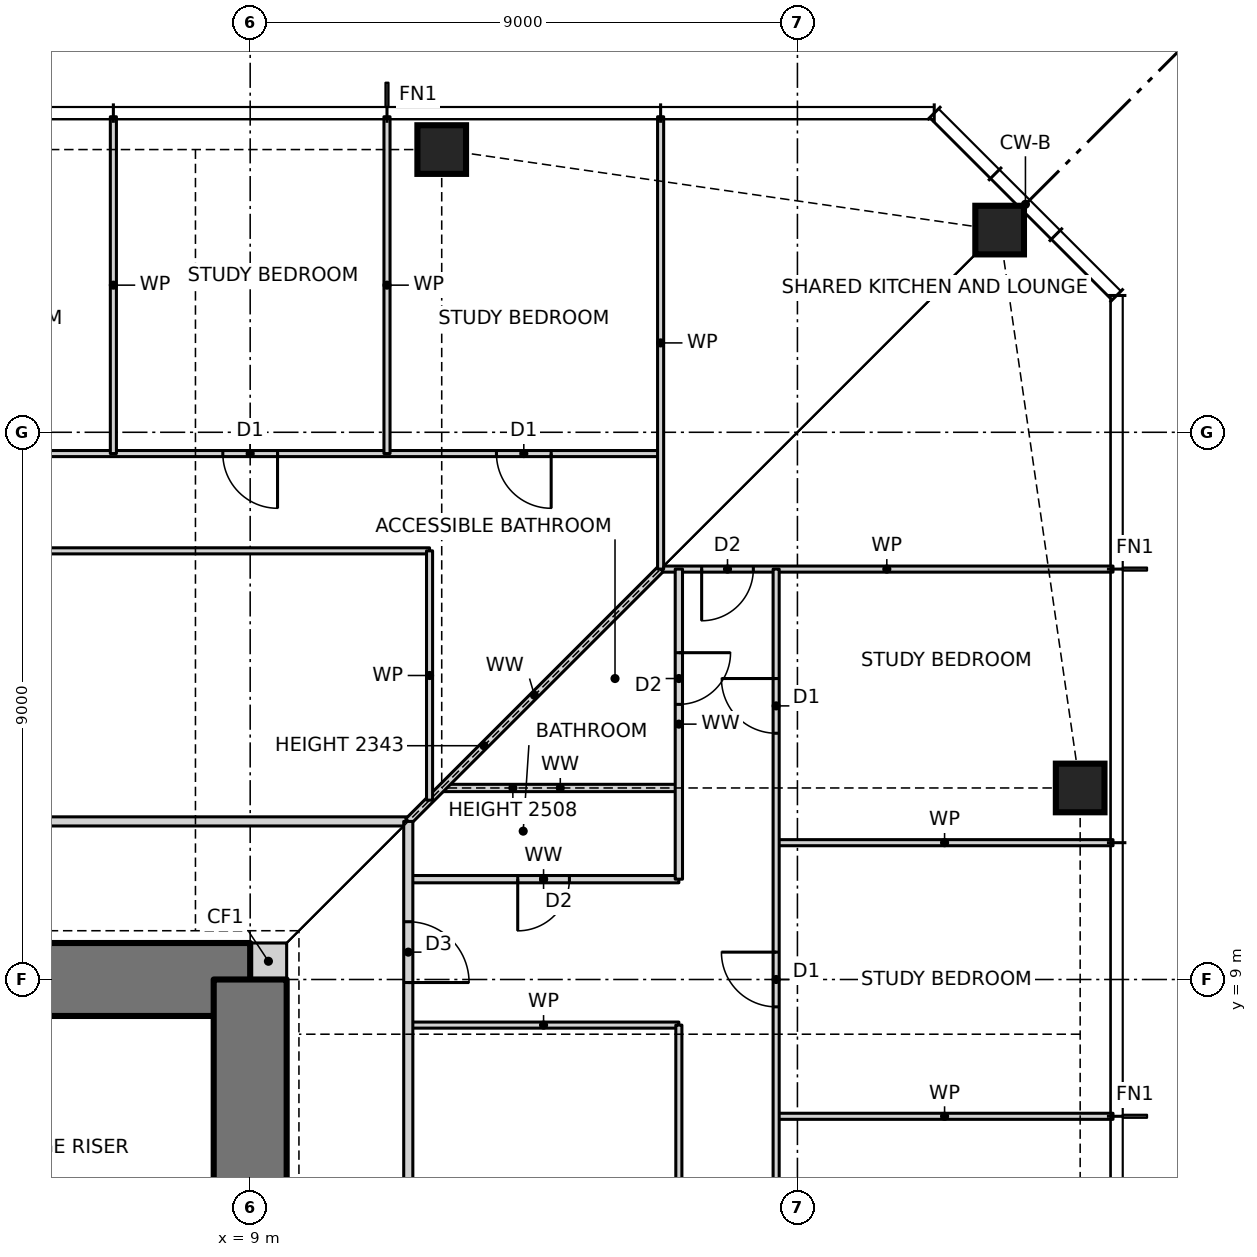
"""IFC4 building model, lengths in metres.
Left out: names, types, materials, properties, quantities, classifications, styles, units other than length and angle.
Written with IfcOpenShell. Run it as: python <this file> out.ifc"""

import sys

from ifc_helpers import new_model, si_unit, direction, frame, frame_2d, origin, origin_2d, place, context, subcontext, project, spatial, rectangle, hollow_rectangle, extrude, element, fill, save


model = new_model("IFC4")
c1 = context("Model", 3, precision=1e-05, world=origin(), true_north=direction((0.0, 1.0)))
c2 = subcontext(c1, "Body", "Model", "MODEL_VIEW")
j1 = project(units=[si_unit("LENGTHUNIT", "METRE"), si_unit("PLANEANGLEUNIT", "RADIAN")], contexts=[c1])
p1 = place(None, origin())
s1 = spatial("IfcSite", under=j1, at=p1, CompositionType="ELEMENT")
p2 = place(p1, origin())
s2 = spatial("IfcBuilding", under=s1, at=p2, CompositionType="ELEMENT")
p3 = place(p2, frame((0.0, 0.0, 15.0)))
s3 = spatial("IfcBuildingStorey", under=s2, at=p3, CompositionType="ELEMENT", Elevation=15.0)
for number, where, z_axis, x_axis in (
    (1, (22.65, 12.15, 0.0), (0.0, 0.0, 1.0), (1.0, 0.0, 0.0)),
    (2, (21.326, 21.326, 0.0), (0.0, 0.0, 1.0), (1.0, 0.0, 0.0)),
    (3, (12.15, 22.65, 0.0), (0.0, 0.0, 1.0), (1.0, 0.0, 0.0)),
):
    element("IfcColumn", number, at=place(p3, frame(where, z_axis=z_axis, x_axis=x_axis)), inside=s3, PredefinedType="COLUMN", context=c2, shape_type="SweptSolid", body=[
        extrude(hollow_rectangle(XDim=0.8, YDim=0.8, WallThickness=0.09, at=origin_2d()), origin(), (0.0, 0.0, 1.0), 3.5),
    ])
p4 = place(p3, frame((9.0, 9.3, 0.0), z_axis=(0.0, 0.0, 1.0), x_axis=(1.0, 0.0, 0.0)))
e4 = element("IfcWall", 4, at=p4, inside=s3, PredefinedType="SOLIDWALL", context=c2, shape_type="SweptSolid", body=[
    extrude(rectangle(XDim=0.6, YDim=0.6, at=frame_2d((0.3, 0.0))), origin(), (0.0, 0.0, 1.0), 3.5),
])
p5 = place(p3, frame((9.0, 9.0, 0.0), z_axis=(0.0, 0.0, 1.0), x_axis=(-1.0, 0.0, 0.0)))
e5 = element("IfcWall", 5, at=p5, inside=s3, PredefinedType="SHEAR", context=c2, shape_type="SweptSolid", body=[
    extrude(rectangle(XDim=18.0, YDim=1.2, at=frame_2d((9.0, 0.0))), origin(), (0.0, 0.0, 1.0), 3.5),
])
p6 = place(p5, frame((11.125, 0.0, 0.0)))
e6 = element("IfcOpeningElement", 6, at=p6, cuts=e5, PredefinedType="OPENING", context=c2, shape_type="SweptSolid", body=[
    extrude(rectangle(XDim=0.9, YDim=2.1, at=frame_2d((0.45, 1.05))), frame((0.0, 0.61, 0.0), z_axis=(0.0, -1.0, 0.0), x_axis=(1.0, 0.0, 0.0)), (0.0, 0.0, 1.0), 1.22),
])
p7 = place(p5, frame((4.275, 0.0, 0.0)))
e7 = element("IfcOpeningElement", 7, at=p7, cuts=e5, PredefinedType="OPENING", context=c2, shape_type="SweptSolid", body=[
    extrude(rectangle(XDim=0.9, YDim=2.1, at=frame_2d((0.45, 1.05))), frame((0.0, 0.61, 0.0), z_axis=(0.0, -1.0, 0.0), x_axis=(1.0, 0.0, 0.0)), (0.0, 0.0, 1.0), 1.22),
])
p8 = place(p3, frame((9.0, -9.0, 0.0), z_axis=(0.0, 0.0, 1.0), x_axis=(0.0, 1.0, 0.0)))
e8 = element("IfcWall", 8, at=p8, inside=s3, PredefinedType="SHEAR", context=c2, shape_type="SweptSolid", body=[
    extrude(rectangle(XDim=18.0, YDim=1.2, at=frame_2d((9.0, 0.0))), origin(), (0.0, 0.0, 1.0), 3.5),
])
p9 = place(p8, frame((8.5, 0.0, 0.0)))
e9 = element("IfcOpeningElement", 9, at=p9, cuts=e8, PredefinedType="OPENING", context=c2, shape_type="SweptSolid", body=[
    extrude(rectangle(XDim=1.0, YDim=2.1, at=frame_2d((0.5, 1.05))), frame((0.0, 0.61, 0.0), z_axis=(0.0, -1.0, 0.0), x_axis=(1.0, 0.0, 0.0)), (0.0, 0.0, 1.0), 1.22),
])
p10 = place(p3, frame((17.65, 6.75, 0.0), z_axis=(0.0, 0.0, 1.0), x_axis=(1.0, 0.0, 0.0)))
e10 = element("IfcWall", 10, at=p10, inside=s3, PredefinedType="PARTITIONING", context=c2, shape_type="SweptSolid", body=[
    extrude(rectangle(XDim=5.54, YDim=0.1, at=frame_2d((2.77, 0.0))), origin(), (0.0, 0.0, 1.0), 3.27),
])
p11 = place(p3, frame((11.6, 8.25, 0.0), z_axis=(0.0, 0.0, 1.0), x_axis=(1.0, 0.0, 0.0)))
e11 = element("IfcWall", 11, at=p11, inside=s3, PredefinedType="PARTITIONING", context=c2, shape_type="SweptSolid", body=[
    extrude(rectangle(XDim=4.45, YDim=0.1, at=frame_2d((2.225, 0.0))), origin(), (0.0, 0.0, 1.0), 3.27),
])
p12 = place(p3, frame((11.6, 10.65, 0.0), z_axis=(0.0, 0.0, 1.0), x_axis=(1.0, 0.0, 0.0)))
e12 = element("IfcWall", 12, at=p12, inside=s3, PredefinedType="PARTITIONING", context=c2, shape_type="SweptSolid", body=[
    extrude(rectangle(XDim=4.45, YDim=0.12, at=frame_2d((2.225, 0.0))), origin(), (0.0, 0.0, 1.0), 3.27),
])
p13 = place(p12, frame((1.8, 0.0, 0.0)))
e13 = element("IfcOpeningElement", 13, at=p13, cuts=e12, PredefinedType="OPENING", context=c2, shape_type="SweptSolid", body=[
    extrude(rectangle(XDim=0.85, YDim=2.1, at=frame_2d((0.425, 1.05))), frame((0.0, 0.07, 0.0), z_axis=(0.0, -1.0, 0.0), x_axis=(1.0, 0.0, 0.0)), (0.0, 0.0, 1.0), 0.14),
])
p14 = place(p3, frame((17.65, 11.25, 0.0), z_axis=(0.0, 0.0, 1.0), x_axis=(1.0, 0.0, 0.0)))
e14 = element("IfcWall", 14, at=p14, inside=s3, PredefinedType="PARTITIONING", context=c2, shape_type="SweptSolid", body=[
    extrude(rectangle(XDim=5.54, YDim=0.1, at=frame_2d((2.77, 0.0))), origin(), (0.0, 0.0, 1.0), 3.27),
])
p15 = place(p3, frame((-11.6, 11.6, 0.0), z_axis=(0.0, 0.0, 1.0), x_axis=(1.0, 0.0, 0.0)))
e15 = element("IfcWall", 15, at=p15, inside=s3, PredefinedType="PARTITIONING", context=c2, shape_type="SweptSolid", body=[
    extrude(rectangle(XDim=23.2, YDim=0.15, at=frame_2d((11.6, 0.0))), origin(), (0.0, 0.0, 1.0), 3.27),
])
p16 = place(p15, frame((1.65, 0.0, 0.0)))
e16 = element("IfcOpeningElement", 16, at=p16, cuts=e15, PredefinedType="OPENING", context=c2, shape_type="SweptSolid", body=[
    extrude(rectangle(XDim=1.0, YDim=2.1, at=frame_2d((0.5, 1.05))), frame((0.0, 0.085, 0.0), z_axis=(0.0, -1.0, 0.0), x_axis=(1.0, 0.0, 0.0)), (0.0, 0.0, 1.0), 0.17),
])
p17 = place(p3, frame((12.15, 12.15, 0.0), z_axis=(0.0, 0.0, 1.0), x_axis=(1.0, 0.0, 0.0)))
e17 = element("IfcWall", 17, at=p17, inside=s3, PredefinedType="PARTITIONING", context=c2, shape_type="SweptSolid", body=[
    extrude(rectangle(XDim=3.9, YDim=0.12, at=frame_2d((1.95, 0.0))), origin(), (0.0, 0.0, 1.0), 2.508),
])
p18 = place(p3, frame((15.75, 15.75, 0.0), z_axis=(0.0, 0.0, 1.0), x_axis=(1.0, 0.0, 0.0)))
e18 = element("IfcWall", 18, at=p18, inside=s3, PredefinedType="PARTITIONING", context=c2, shape_type="SweptSolid", body=[
    extrude(rectangle(XDim=7.44, YDim=0.1, at=frame_2d((3.72, 0.0))), origin(), (0.0, 0.0, 1.0), 3.27),
])
p19 = place(p18, frame((0.675, 0.0, 0.0)))
e19 = element("IfcOpeningElement", 19, at=p19, cuts=e18, PredefinedType="OPENING", context=c2, shape_type="SweptSolid", body=[
    extrude(rectangle(XDim=0.85, YDim=2.1, at=frame_2d((0.425, 1.05))), frame((0.0, 0.06, 0.0), z_axis=(0.0, -1.0, 0.0), x_axis=(1.0, 0.0, 0.0)), (0.0, 0.0, 1.0), 0.12),
])
p20 = place(p3, frame((-8.25, 16.05, 0.0), z_axis=(0.0, 0.0, 1.0), x_axis=(1.0, 0.0, 0.0)))
e20 = element("IfcWall", 20, at=p20, inside=s3, PredefinedType="PARTITIONING", context=c2, shape_type="SweptSolid", body=[
    extrude(rectangle(XDim=20.2, YDim=0.1, at=frame_2d((10.1, 0.0))), origin(), (0.0, 0.0, 1.0), 3.27),
])
p21 = place(p20, frame((9.675, 0.0, 0.0)))
e21 = element("IfcOpeningElement", 21, at=p21, cuts=e20, PredefinedType="OPENING", context=c2, shape_type="SweptSolid", body=[
    extrude(rectangle(XDim=0.85, YDim=2.1, at=frame_2d((0.425, 1.05))), frame((0.0, 0.06, 0.0), z_axis=(0.0, -1.0, 0.0), x_axis=(1.0, 0.0, 0.0)), (0.0, 0.0, 1.0), 0.12),
])
p22 = place(p3, frame((-15.75, 17.65, 0.0), z_axis=(0.0, 0.0, 1.0), x_axis=(1.0, 0.0, 0.0)))
e22 = element("IfcWall", 22, at=p22, inside=s3, PredefinedType="PARTITIONING", context=c2, shape_type="SweptSolid", body=[
    extrude(rectangle(XDim=31.5, YDim=0.1, at=frame_2d((15.75, 0.0))), origin(), (0.0, 0.0, 1.0), 3.27),
])
p23 = place(p22, frame((28.8, 0.0, 0.0)))
e23 = element("IfcOpeningElement", 23, at=p23, cuts=e22, PredefinedType="OPENING", context=c2, shape_type="SweptSolid", body=[
    extrude(rectangle(XDim=0.9, YDim=2.1, at=frame_2d((0.45, 1.05))), frame((0.0, 0.06, 0.0), z_axis=(0.0, -1.0, 0.0), x_axis=(1.0, 0.0, 0.0)), (0.0, 0.0, 1.0), 0.12),
])
p24 = place(p22, frame((24.3, 0.0, 0.0)))
e24 = element("IfcOpeningElement", 24, at=p24, cuts=e22, PredefinedType="OPENING", context=c2, shape_type="SweptSolid", body=[
    extrude(rectangle(XDim=0.9, YDim=2.1, at=frame_2d((0.45, 1.05))), frame((0.0, 0.06, 0.0), z_axis=(0.0, -1.0, 0.0), x_axis=(1.0, 0.0, 0.0)), (0.0, 0.0, 1.0), 0.12),
])
p25 = place(p22, frame((19.8, 0.0, 0.0)))
e25 = element("IfcOpeningElement", 25, at=p25, cuts=e22, PredefinedType="OPENING", context=c2, shape_type="SweptSolid", body=[
    extrude(rectangle(XDim=0.9, YDim=2.1, at=frame_2d((0.45, 1.05))), frame((0.0, 0.06, 0.0), z_axis=(0.0, -1.0, 0.0), x_axis=(1.0, 0.0, 0.0)), (0.0, 0.0, 1.0), 0.12),
])
p26 = place(p22, frame((15.3, 0.0, 0.0)))
e26 = element("IfcOpeningElement", 26, at=p26, cuts=e22, PredefinedType="OPENING", context=c2, shape_type="SweptSolid", body=[
    extrude(rectangle(XDim=0.9, YDim=2.1, at=frame_2d((0.45, 1.05))), frame((0.0, 0.06, 0.0), z_axis=(0.0, -1.0, 0.0), x_axis=(1.0, 0.0, 0.0)), (0.0, 0.0, 1.0), 0.12),
])
p27 = place(p22, frame((10.8, 0.0, 0.0)))
e27 = element("IfcOpeningElement", 27, at=p27, cuts=e22, PredefinedType="OPENING", context=c2, shape_type="SweptSolid", body=[
    extrude(rectangle(XDim=0.9, YDim=2.1, at=frame_2d((0.45, 1.05))), frame((0.0, 0.06, 0.0), z_axis=(0.0, -1.0, 0.0), x_axis=(1.0, 0.0, 0.0)), (0.0, 0.0, 1.0), 0.12),
])
p28 = place(p22, frame((6.3, 0.0, 0.0)))
e28 = element("IfcOpeningElement", 28, at=p28, cuts=e22, PredefinedType="OPENING", context=c2, shape_type="SweptSolid", body=[
    extrude(rectangle(XDim=0.9, YDim=2.1, at=frame_2d((0.45, 1.05))), frame((0.0, 0.06, 0.0), z_axis=(0.0, -1.0, 0.0), x_axis=(1.0, 0.0, 0.0)), (0.0, 0.0, 1.0), 0.12),
])
p29 = place(p22, frame((1.8, 0.0, 0.0)))
e29 = element("IfcOpeningElement", 29, at=p29, cuts=e22, PredefinedType="OPENING", context=c2, shape_type="SweptSolid", body=[
    extrude(rectangle(XDim=0.9, YDim=2.1, at=frame_2d((0.45, 1.05))), frame((0.0, 0.06, 0.0), z_axis=(0.0, -1.0, 0.0), x_axis=(1.0, 0.0, 0.0)), (0.0, 0.0, 1.0), 0.12),
])
p30 = place(p3, frame((11.6, 11.6, 0.0), z_axis=(0.0, 0.0, 1.0), x_axis=(0.707106781187, 0.707106781187, 0.0)))
e30 = element("IfcWall", 30, at=p30, inside=s3, PredefinedType="PARTITIONING", context=c2, shape_type="SweptSolid", body=[
    extrude(rectangle(XDim=5.869, YDim=0.12, at=frame_2d((2.935, 0.0))), origin(), (0.0, 0.0, 1.0), 2.343),
])
p31 = place(p3, frame((17.65, -15.75, 0.0), z_axis=(0.0, 0.0, 1.0), x_axis=(0.0, 1.0, 0.0)))
e31 = element("IfcWall", 31, at=p31, inside=s3, PredefinedType="PARTITIONING", context=c2, shape_type="SweptSolid", body=[
    extrude(rectangle(XDim=31.5, YDim=0.1, at=frame_2d((15.75, 0.0))), origin(), (0.0, 0.0, 1.0), 3.27),
])
p32 = place(p31, frame((1.8, 0.0, 0.0)))
e32 = element("IfcOpeningElement", 32, at=p32, cuts=e31, PredefinedType="OPENING", context=c2, shape_type="SweptSolid", body=[
    extrude(rectangle(XDim=0.9, YDim=2.1, at=frame_2d((0.45, 1.05))), frame((0.0, 0.06, 0.0), z_axis=(0.0, -1.0, 0.0), x_axis=(1.0, 0.0, 0.0)), (0.0, 0.0, 1.0), 0.12),
])
p33 = place(p31, frame((6.3, 0.0, 0.0)))
e33 = element("IfcOpeningElement", 33, at=p33, cuts=e31, PredefinedType="OPENING", context=c2, shape_type="SweptSolid", body=[
    extrude(rectangle(XDim=0.9, YDim=2.1, at=frame_2d((0.45, 1.05))), frame((0.0, 0.06, 0.0), z_axis=(0.0, -1.0, 0.0), x_axis=(1.0, 0.0, 0.0)), (0.0, 0.0, 1.0), 0.12),
])
p34 = place(p31, frame((10.8, 0.0, 0.0)))
e34 = element("IfcOpeningElement", 34, at=p34, cuts=e31, PredefinedType="OPENING", context=c2, shape_type="SweptSolid", body=[
    extrude(rectangle(XDim=0.9, YDim=2.1, at=frame_2d((0.45, 1.05))), frame((0.0, 0.06, 0.0), z_axis=(0.0, -1.0, 0.0), x_axis=(1.0, 0.0, 0.0)), (0.0, 0.0, 1.0), 0.12),
])
p35 = place(p31, frame((15.3, 0.0, 0.0)))
e35 = element("IfcOpeningElement", 35, at=p35, cuts=e31, PredefinedType="OPENING", context=c2, shape_type="SweptSolid", body=[
    extrude(rectangle(XDim=0.9, YDim=2.1, at=frame_2d((0.45, 1.05))), frame((0.0, 0.06, 0.0), z_axis=(0.0, -1.0, 0.0), x_axis=(1.0, 0.0, 0.0)), (0.0, 0.0, 1.0), 0.12),
])
p36 = place(p31, frame((19.8, 0.0, 0.0)))
e36 = element("IfcOpeningElement", 36, at=p36, cuts=e31, PredefinedType="OPENING", context=c2, shape_type="SweptSolid", body=[
    extrude(rectangle(XDim=0.9, YDim=2.1, at=frame_2d((0.45, 1.05))), frame((0.0, 0.06, 0.0), z_axis=(0.0, -1.0, 0.0), x_axis=(1.0, 0.0, 0.0)), (0.0, 0.0, 1.0), 0.12),
])
p37 = place(p31, frame((24.3, 0.0, 0.0)))
e37 = element("IfcOpeningElement", 37, at=p37, cuts=e31, PredefinedType="OPENING", context=c2, shape_type="SweptSolid", body=[
    extrude(rectangle(XDim=0.9, YDim=2.1, at=frame_2d((0.45, 1.05))), frame((0.0, 0.06, 0.0), z_axis=(0.0, -1.0, 0.0), x_axis=(1.0, 0.0, 0.0)), (0.0, 0.0, 1.0), 0.12),
])
p38 = place(p31, frame((28.8, 0.0, 0.0)))
e38 = element("IfcOpeningElement", 38, at=p38, cuts=e31, PredefinedType="OPENING", context=c2, shape_type="SweptSolid", body=[
    extrude(rectangle(XDim=0.9, YDim=2.1, at=frame_2d((0.45, 1.05))), frame((0.0, 0.06, 0.0), z_axis=(0.0, -1.0, 0.0), x_axis=(1.0, 0.0, 0.0)), (0.0, 0.0, 1.0), 0.12),
])
p39 = place(p3, frame((16.05, -11.95, 0.0), z_axis=(0.0, 0.0, 1.0), x_axis=(0.0, 1.0, 0.0)))
e39 = element("IfcWall", 39, at=p39, inside=s3, PredefinedType="PARTITIONING", context=c2, shape_type="SweptSolid", body=[
    extrude(rectangle(XDim=20.2, YDim=0.1, at=frame_2d((10.1, 0.0))), origin(), (0.0, 0.0, 1.0), 3.27),
])
p40 = place(p39, frame((9.675, 0.0, 0.0)))
e40 = element("IfcOpeningElement", 40, at=p40, cuts=e39, PredefinedType="OPENING", context=c2, shape_type="SweptSolid", body=[
    extrude(rectangle(XDim=0.85, YDim=2.1, at=frame_2d((0.425, 1.05))), frame((0.0, 0.06, 0.0), z_axis=(0.0, -1.0, 0.0), x_axis=(1.0, 0.0, 0.0)), (0.0, 0.0, 1.0), 0.12),
])
p41 = place(p3, frame((16.05, 10.65, 0.0), z_axis=(0.0, 0.0, 1.0), x_axis=(0.0, 1.0, 0.0)))
e41 = element("IfcWall", 41, at=p41, inside=s3, PredefinedType="PARTITIONING", context=c2, shape_type="SweptSolid", body=[
    extrude(rectangle(XDim=5.1, YDim=0.12, at=frame_2d((2.55, 0.0))), origin(), (0.0, 0.0, 1.0), 3.27),
])
p42 = place(p41, frame((2.875, 0.0, 0.0)))
e42 = element("IfcOpeningElement", 42, at=p42, cuts=e41, PredefinedType="OPENING", context=c2, shape_type="SweptSolid", body=[
    extrude(rectangle(XDim=0.85, YDim=2.1, at=frame_2d((0.425, 1.05))), frame((0.0, 0.07, 0.0), z_axis=(0.0, -1.0, 0.0), x_axis=(1.0, 0.0, 0.0)), (0.0, 0.0, 1.0), 0.14),
])
p43 = place(p3, frame((15.75, 15.75, 0.0), z_axis=(0.0, 0.0, 1.0), x_axis=(0.0, 1.0, 0.0)))
e43 = element("IfcWall", 43, at=p43, inside=s3, PredefinedType="PARTITIONING", context=c2, shape_type="SweptSolid", body=[
    extrude(rectangle(XDim=7.44, YDim=0.1, at=frame_2d((3.72, 0.0))), origin(), (0.0, 0.0, 1.0), 3.27),
])
p44 = place(p3, frame((11.95, 11.95, 0.0), z_axis=(0.0, 0.0, 1.0), x_axis=(0.0, 1.0, 0.0)))
e44 = element("IfcWall", 44, at=p44, inside=s3, PredefinedType="PARTITIONING", context=c2, shape_type="SweptSolid", body=[
    extrude(rectangle(XDim=4.1, YDim=0.1, at=frame_2d((2.05, 0.0))), origin(), (0.0, 0.0, 1.0), 3.27),
])
p45 = place(p3, frame((11.6, -12.6, 0.0), z_axis=(0.0, 0.0, 1.0), x_axis=(0.0, 1.0, 0.0)))
e45 = element("IfcWall", 45, at=p45, inside=s3, PredefinedType="PARTITIONING", context=c2, shape_type="SweptSolid", body=[
    extrude(rectangle(XDim=24.2, YDim=0.15, at=frame_2d((12.1, 0.0))), origin(), (0.0, 0.0, 1.0), 3.27),
])
p46 = place(p45, frame((21.55, 0.0, 0.0)))
e46 = element("IfcOpeningElement", 46, at=p46, cuts=e45, PredefinedType="OPENING", context=c2, shape_type="SweptSolid", body=[
    extrude(rectangle(XDim=1.0, YDim=2.1, at=frame_2d((0.5, 1.05))), frame((0.0, 0.085, 0.0), z_axis=(0.0, -1.0, 0.0), x_axis=(1.0, 0.0, 0.0)), (0.0, 0.0, 1.0), 0.17),
])
for number, where, z_axis, x_axis in (
    (47, (11.25, 17.65, 0.0), (0.0, 0.0, 1.0), (0.0, 1.0, 0.0)),
    (48, (6.75, 17.65, 0.0), (0.0, 0.0, 1.0), (0.0, 1.0, 0.0)),
):
    element("IfcWall", number, at=place(p3, frame(where, z_axis=z_axis, x_axis=x_axis)), inside=s3, PredefinedType="PARTITIONING", context=c2, shape_type="SweptSolid", body=[
        extrude(rectangle(XDim=5.54, YDim=0.1, at=frame_2d((2.77, 0.0))), origin(), (0.0, 0.0, 1.0), 3.27),
    ])
p47 = place(p37, origin())
e49 = element("IfcDoor", 49, at=p47, inside=s3, OperationType="SINGLE_SWING_RIGHT", PredefinedType="DOOR", context=c2, shape_type="SweptSolid", body=[
    extrude(rectangle(XDim=0.9, YDim=2.1, at=frame_2d((0.45, 1.05))), frame((0.0, 0.025, 0.0), z_axis=(0.0, -1.0, 0.0), x_axis=(1.0, 0.0, 0.0)), (0.0, 0.0, 1.0), 0.05),
])
fill(e37, e49)
p48 = place(p38, origin())
e50 = element("IfcDoor", 50, at=p48, inside=s3, OperationType="SINGLE_SWING_RIGHT", PredefinedType="DOOR", context=c2, shape_type="SweptSolid", body=[
    extrude(rectangle(XDim=0.9, YDim=2.1, at=frame_2d((0.45, 1.05))), frame((0.0, 0.025, 0.0), z_axis=(0.0, -1.0, 0.0), x_axis=(1.0, 0.0, 0.0)), (0.0, 0.0, 1.0), 0.05),
])
fill(e38, e50)
p49 = place(p46, frame((1.0, 0.0, 0.0), z_axis=(0.0, 0.0, 1.0), x_axis=(-1.0, 0.0, 0.0)))
e51 = element("IfcDoor", 51, at=p49, inside=s3, OperationType="SINGLE_SWING_RIGHT", PredefinedType="DOOR", context=c2, shape_type="SweptSolid", body=[
    extrude(rectangle(XDim=1.0, YDim=2.1, at=frame_2d((0.5, 1.05))), frame((0.0, 0.025, 0.0), z_axis=(0.0, -1.0, 0.0), x_axis=(1.0, 0.0, 0.0)), (0.0, 0.0, 1.0), 0.05),
])
fill(e46, e51)
p50 = place(p13, frame((0.85, 0.0, 0.0), z_axis=(0.0, 0.0, 1.0), x_axis=(-1.0, 0.0, 0.0)))
e52 = element("IfcDoor", 52, at=p50, inside=s3, OperationType="SINGLE_SWING_RIGHT", PredefinedType="DOOR", context=c2, shape_type="SweptSolid", body=[
    extrude(rectangle(XDim=0.85, YDim=2.1, at=frame_2d((0.425, 1.05))), frame((0.0, 0.025, 0.0), z_axis=(0.0, -1.0, 0.0), x_axis=(1.0, 0.0, 0.0)), (0.0, 0.0, 1.0), 0.05),
])
fill(e13, e52)
p51 = place(p42, frame((0.85, 0.0, 0.0), z_axis=(0.0, 0.0, 1.0), x_axis=(-1.0, 0.0, 0.0)))
e53 = element("IfcDoor", 53, at=p51, inside=s3, OperationType="SINGLE_SWING_LEFT", PredefinedType="DOOR", context=c2, shape_type="SweptSolid", body=[
    extrude(rectangle(XDim=0.85, YDim=2.1, at=frame_2d((0.425, 1.05))), frame((0.0, 0.025, 0.0), z_axis=(0.0, -1.0, 0.0), x_axis=(1.0, 0.0, 0.0)), (0.0, 0.0, 1.0), 0.05),
])
fill(e42, e53)
p52 = place(p23, frame((0.9, 0.0, 0.0), z_axis=(0.0, 0.0, 1.0), x_axis=(-1.0, 0.0, 0.0)))
e54 = element("IfcDoor", 54, at=p52, inside=s3, OperationType="SINGLE_SWING_LEFT", PredefinedType="DOOR", context=c2, shape_type="SweptSolid", body=[
    extrude(rectangle(XDim=0.9, YDim=2.1, at=frame_2d((0.45, 1.05))), frame((0.0, 0.025, 0.0), z_axis=(0.0, -1.0, 0.0), x_axis=(1.0, 0.0, 0.0)), (0.0, 0.0, 1.0), 0.05),
])
fill(e23, e54)
p53 = place(p24, frame((0.9, 0.0, 0.0), z_axis=(0.0, 0.0, 1.0), x_axis=(-1.0, 0.0, 0.0)))
e55 = element("IfcDoor", 55, at=p53, inside=s3, OperationType="SINGLE_SWING_LEFT", PredefinedType="DOOR", context=c2, shape_type="SweptSolid", body=[
    extrude(rectangle(XDim=0.9, YDim=2.1, at=frame_2d((0.45, 1.05))), frame((0.0, 0.025, 0.0), z_axis=(0.0, -1.0, 0.0), x_axis=(1.0, 0.0, 0.0)), (0.0, 0.0, 1.0), 0.05),
])
fill(e24, e55)
p54 = place(p19, frame((0.85, 0.0, 0.0), z_axis=(0.0, 0.0, 1.0), x_axis=(-1.0, 0.0, 0.0)))
e56 = element("IfcDoor", 56, at=p54, inside=s3, OperationType="SINGLE_SWING_RIGHT", PredefinedType="DOOR", context=c2, shape_type="SweptSolid", body=[
    extrude(rectangle(XDim=0.85, YDim=2.1, at=frame_2d((0.425, 1.05))), frame((0.0, 0.025, 0.0), z_axis=(0.0, -1.0, 0.0), x_axis=(1.0, 0.0, 0.0)), (0.0, 0.0, 1.0), 0.05),
])
fill(e19, e56)
save(model, sys.argv[1])
